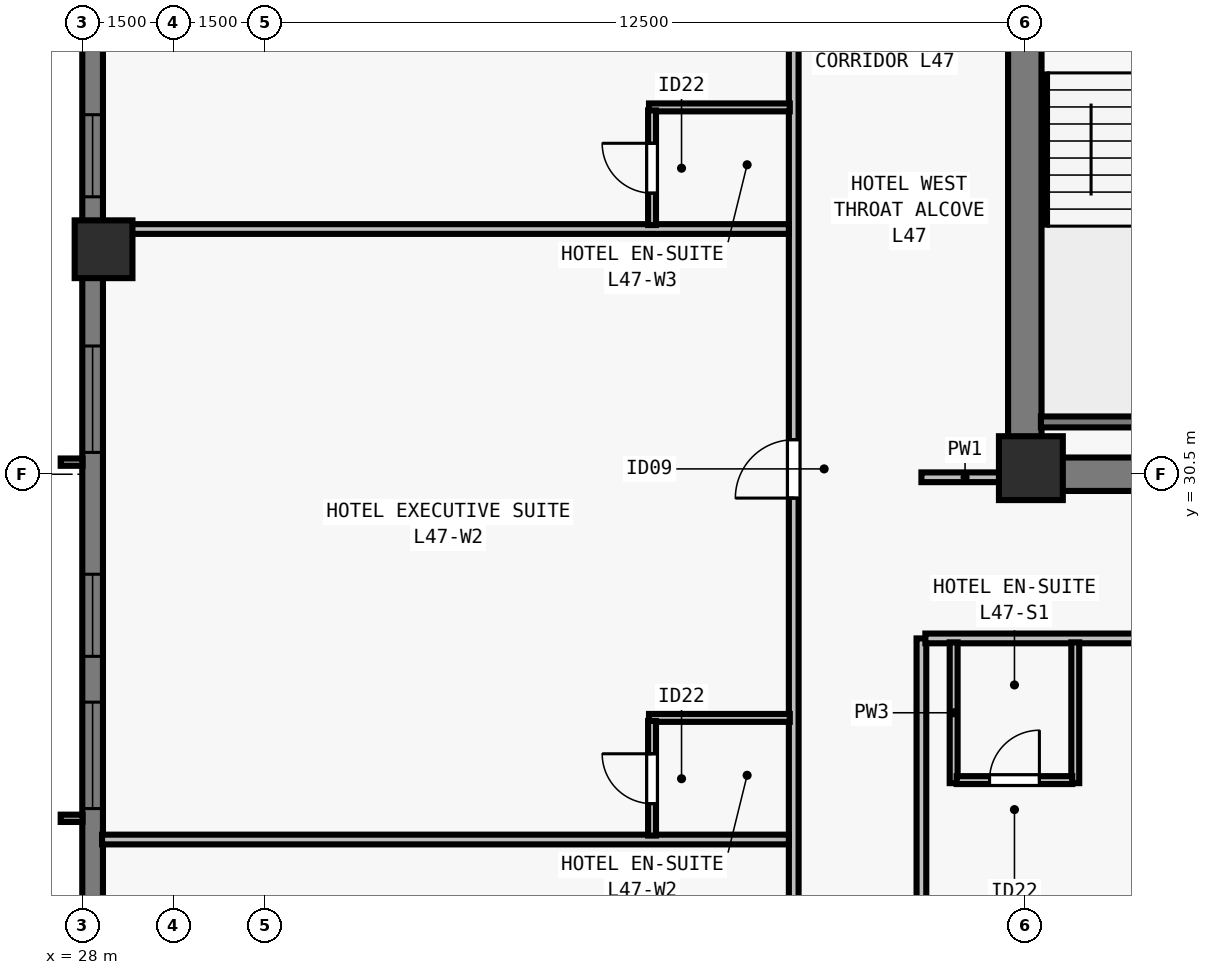
"""IFC4 building model, lengths in metres.
Left out: names, types, materials, properties, quantities, classifications, styles, units other than length and angle.
Written with IfcOpenShell. Run it as: python <this file> out.ifc"""

import sys

from ifc_helpers import new_model, si_unit, direction, frame, frame_2d, origin, origin_2d, place, context, subcontext, project, spatial, rectangle, extrude, element, fill, save


model = new_model("IFC4")
c1 = context("Model", 3, precision=1e-05, world=origin(), true_north=direction((0.0, 1.0)))
c2 = subcontext(c1, "Body", "Model", "MODEL_VIEW")
j1 = project(units=[si_unit("LENGTHUNIT", "METRE"), si_unit("PLANEANGLEUNIT", "RADIAN")], contexts=[c1])
p1 = place(None, origin())
s1 = spatial("IfcSite", under=j1, at=p1, CompositionType="ELEMENT")
p2 = place(p1, origin())
s2 = spatial("IfcBuilding", under=s1, at=p2, CompositionType="ELEMENT")
p3 = place(p2, frame((0.0, 0.0, 172.5)))
s3 = spatial("IfcBuildingStorey", under=s2, at=p3, CompositionType="ELEMENT", Elevation=172.5)
p4 = place(p3, frame((43.6, 30.6, 0.0), z_axis=(0.0, 0.0, 1.0), x_axis=(1.0, 0.0, 0.0)))
e1 = element("IfcColumn", 1, at=p4, inside=s3, PredefinedType="COLUMN", context=c2, shape_type="SweptSolid", body=[
    extrude(rectangle(XDim=1.05, YDim=1.05, at=origin_2d()), origin(), (0.0, 0.0, 1.0), 3.5),
])
p5 = place(p3, frame((28.35, 34.2, 0.0), z_axis=(0.0, 0.0, 1.0), x_axis=(0.0, 1.0, 0.0)))
e2 = element("IfcColumn", 2, at=p5, inside=s3, PredefinedType="COLUMN", context=c2, shape_type="SweptSolid", body=[
    extrude(rectangle(XDim=0.95, YDim=0.95, at=origin_2d()), origin(), (0.0, 0.0, 1.0), 3.5),
])
p6 = place(p3, frame((28.17, 19.0, 0.0), z_axis=(0.0, 0.0, 1.0), x_axis=(0.0, 1.0, 0.0)))
e3 = element("IfcWall", 3, at=p6, inside=s3, PredefinedType="SOLIDWALL", context=c2, shape_type="SweptSolid", body=[
    extrude(rectangle(XDim=39.682, YDim=0.34, at=frame_2d((19.841, 0.0))), origin(), (0.0, 0.0, 1.0), 3.28),
])
p7 = place(p6, frame((6.002, 0.0, 0.8)))
e4 = element("IfcOpeningElement", 4, at=p7, cuts=e3, PredefinedType="OPENING", context=c2, shape_type="SweptSolid", body=[
    extrude(rectangle(XDim=1.75, YDim=1.66, at=frame_2d((0.875, 0.83))), frame((0.0, 0.18, 0.0), z_axis=(0.0, -1.0, 0.0), x_axis=(1.0, 0.0, 0.0)), (0.0, 0.0, 1.0), 0.36),
])
p8 = place(p6, frame((8.505, 0.0, 0.8)))
e5 = element("IfcOpeningElement", 5, at=p8, cuts=e3, PredefinedType="OPENING", context=c2, shape_type="SweptSolid", body=[
    extrude(rectangle(XDim=1.35, YDim=1.66, at=frame_2d((0.675, 0.83))), frame((0.0, 0.18, 0.0), z_axis=(0.0, -1.0, 0.0), x_axis=(1.0, 0.0, 0.0)), (0.0, 0.0, 1.0), 0.36),
])
p9 = place(p6, frame((11.859, 0.0, 0.8)))
e6 = element("IfcOpeningElement", 6, at=p9, cuts=e3, PredefinedType="OPENING", context=c2, shape_type="SweptSolid", body=[
    extrude(rectangle(XDim=1.75, YDim=1.66, at=frame_2d((0.875, 0.83))), frame((0.0, 0.18, 0.0), z_axis=(0.0, -1.0, 0.0), x_axis=(1.0, 0.0, 0.0)), (0.0, 0.0, 1.0), 0.36),
])
p10 = place(p6, frame((16.062, 0.0, 0.8)))
e7 = element("IfcOpeningElement", 7, at=p10, cuts=e3, PredefinedType="OPENING", context=c2, shape_type="SweptSolid", body=[
    extrude(rectangle(XDim=1.35, YDim=1.66, at=frame_2d((0.675, 0.83))), frame((0.0, 0.18, 0.0), z_axis=(0.0, -1.0, 0.0), x_axis=(1.0, 0.0, 0.0)), (0.0, 0.0, 1.0), 0.36),
])
p11 = place(p6, frame((18.966, 0.0, 0.8)))
e8 = element("IfcOpeningElement", 8, at=p11, cuts=e3, PredefinedType="OPENING", context=c2, shape_type="SweptSolid", body=[
    extrude(rectangle(XDim=1.75, YDim=1.66, at=frame_2d((0.875, 0.83))), frame((0.0, 0.18, 0.0), z_axis=(0.0, -1.0, 0.0), x_axis=(1.0, 0.0, 0.0)), (0.0, 0.0, 1.0), 0.36),
])
p12 = place(p6, frame((22.27, 0.0, 0.8)))
e9 = element("IfcOpeningElement", 9, at=p12, cuts=e3, PredefinedType="OPENING", context=c2, shape_type="SweptSolid", body=[
    extrude(rectangle(XDim=1.35, YDim=1.66, at=frame_2d((0.675, 0.83))), frame((0.0, 0.18, 0.0), z_axis=(0.0, -1.0, 0.0), x_axis=(1.0, 0.0, 0.0)), (0.0, 0.0, 1.0), 0.36),
])
p13 = place(p6, frame((26.073, 0.0, 0.8)))
e10 = element("IfcOpeningElement", 10, at=p13, cuts=e3, PredefinedType="OPENING", context=c2, shape_type="SweptSolid", body=[
    extrude(rectangle(XDim=1.75, YDim=1.66, at=frame_2d((0.875, 0.83))), frame((0.0, 0.18, 0.0), z_axis=(0.0, -1.0, 0.0), x_axis=(1.0, 0.0, 0.0)), (0.0, 0.0, 1.0), 0.36),
])
p14 = place(p6, frame((29.827, 0.0, 0.8)))
e11 = element("IfcOpeningElement", 11, at=p14, cuts=e3, PredefinedType="OPENING", context=c2, shape_type="SweptSolid", body=[
    extrude(rectangle(XDim=1.35, YDim=1.66, at=frame_2d((0.675, 0.83))), frame((0.0, 0.18, 0.0), z_axis=(0.0, -1.0, 0.0), x_axis=(1.0, 0.0, 0.0)), (0.0, 0.0, 1.0), 0.36),
])
p15 = place(p6, frame((32.33, 0.0, 0.8)))
e12 = element("IfcOpeningElement", 12, at=p15, cuts=e3, PredefinedType="OPENING", context=c2, shape_type="SweptSolid", body=[
    extrude(rectangle(XDim=1.75, YDim=1.66, at=frame_2d((0.875, 0.83))), frame((0.0, 0.18, 0.0), z_axis=(0.0, -1.0, 0.0), x_axis=(1.0, 0.0, 0.0)), (0.0, 0.0, 1.0), 0.36),
])
p16 = place(p3, frame((43.225, 30.5, 0.0), z_axis=(0.0, 0.0, 1.0), x_axis=(1.0, 0.0, 0.0)))
e13 = element("IfcWall", 13, at=p16, inside=s3, PredefinedType="SHEAR", context=c2, shape_type="SweptSolid", body=[
    extrude(rectangle(XDim=17.55, YDim=0.55, at=frame_2d((8.775, 0.0))), origin(), (0.0, 0.0, 1.0), 3.28),
])
p17 = place(p3, frame((43.5, 30.765, 0.0), z_axis=(0.0, 0.0, 1.0), x_axis=(0.0, 1.0, 0.0)))
e14 = element("IfcWall", 14, at=p17, inside=s3, PredefinedType="SHEAR", context=c2, shape_type="SweptSolid", body=[
    extrude(rectangle(XDim=7.985, YDim=0.55, at=frame_2d((3.993, 0.0))), origin(), (0.0, 0.0, 1.0), 3.28),
])
p18 = place(p3, frame((39.7, 15.325, 0.0), z_axis=(0.0, 0.0, 1.0), x_axis=(0.0, 1.0, 0.0)))
e15 = element("IfcWall", 15, at=p18, inside=s3, PredefinedType="PARTITIONING", context=c2, shape_type="SweptSolid", body=[
    extrude(rectangle(XDim=47.35, YDim=0.16, at=frame_2d((23.675, 0.0))), origin(), (0.0, 0.0, 1.0), 2.555),
])
p19 = place(p18, frame((5.451, 0.0, 0.0)))
e16 = element("IfcOpeningElement", 16, at=p19, cuts=e15, PredefinedType="OPENING", context=c2, shape_type="SweptSolid", body=[
    extrude(rectangle(XDim=0.96, YDim=2.15, at=frame_2d((0.48, 1.075))), frame((0.0, 0.09, 0.0), z_axis=(0.0, -1.0, 0.0), x_axis=(1.0, 0.0, 0.0)), (0.0, 0.0, 1.0), 0.18),
])
p20 = place(p18, frame((14.783, 0.0, 0.0)))
e17 = element("IfcOpeningElement", 17, at=p20, cuts=e15, PredefinedType="OPENING", context=c2, shape_type="SweptSolid", body=[
    extrude(rectangle(XDim=0.96, YDim=2.15, at=frame_2d((0.48, 1.075))), frame((0.0, 0.09, 0.0), z_axis=(0.0, -1.0, 0.0), x_axis=(1.0, 0.0, 0.0)), (0.0, 0.0, 1.0), 0.18),
])
p21 = place(p18, frame((24.215, 0.0, 0.0)))
e18 = element("IfcOpeningElement", 18, at=p21, cuts=e15, PredefinedType="OPENING", context=c2, shape_type="SweptSolid", body=[
    extrude(rectangle(XDim=0.96, YDim=2.15, at=frame_2d((0.48, 1.075))), frame((0.0, 0.09, 0.0), z_axis=(0.0, -1.0, 0.0), x_axis=(1.0, 0.0, 0.0)), (0.0, 0.0, 1.0), 0.18),
])
p22 = place(p18, frame((33.647, 0.0, 0.0)))
e19 = element("IfcOpeningElement", 19, at=p22, cuts=e15, PredefinedType="OPENING", context=c2, shape_type="SweptSolid", body=[
    extrude(rectangle(XDim=0.96, YDim=2.15, at=frame_2d((0.48, 1.075))), frame((0.0, 0.09, 0.0), z_axis=(0.0, -1.0, 0.0), x_axis=(1.0, 0.0, 0.0)), (0.0, 0.0, 1.0), 0.18),
])
p23 = place(p18, frame((43.258, 0.0, 0.0)))
e20 = element("IfcOpeningElement", 20, at=p23, cuts=e15, PredefinedType="OPENING", context=c2, shape_type="SweptSolid", body=[
    extrude(rectangle(XDim=0.96, YDim=2.15, at=frame_2d((0.48, 1.075))), frame((0.0, 0.09, 0.0), z_axis=(0.0, -1.0, 0.0), x_axis=(1.0, 0.0, 0.0)), (0.0, 0.0, 1.0), 0.18),
])
p24 = place(p3, frame((41.8, 15.325, 0.0), z_axis=(0.0, 0.0, 1.0), x_axis=(0.0, 1.0, 0.0)))
e21 = element("IfcWall", 21, at=p24, inside=s3, PredefinedType="PARTITIONING", context=c2, shape_type="SweptSolid", body=[
    extrude(rectangle(XDim=12.475, YDim=0.16, at=frame_2d((6.238, 0.0))), origin(), (0.0, 0.0, 1.0), 3.28),
])
p25 = place(p3, frame((41.8, 30.45, 0.0), z_axis=(0.0, 0.0, 1.0), x_axis=(1.0, 0.0, 0.0)))
e22 = element("IfcWall", 22, at=p25, inside=s3, PredefinedType="PARTITIONING", context=c2, shape_type="SweptSolid", body=[
    extrude(rectangle(XDim=1.435, YDim=0.16, at=frame_2d((0.718, 0.0))), origin(), (0.0, 0.0, 1.0), 3.28),
])
p26 = place(p3, frame((41.865, 27.8, 0.0), z_axis=(0.0, 0.0, 1.0), x_axis=(1.0, 0.0, 0.0)))
e23 = element("IfcWall", 23, at=p26, inside=s3, PredefinedType="PARTITIONING", context=c2, shape_type="SweptSolid", body=[
    extrude(rectangle(XDim=22.07, YDim=0.16, at=frame_2d((11.035, 0.0))), origin(), (0.0, 0.0, 1.0), 3.28),
])
p27 = place(p26, frame((4.232, 0.0, 0.0)))
e24 = element("IfcOpeningElement", 24, at=p27, cuts=e23, PredefinedType="OPENING", context=c2, shape_type="SweptSolid", body=[
    extrude(rectangle(XDim=0.96, YDim=2.15, at=frame_2d((0.48, 1.075))), frame((0.0, 0.09, 0.0), z_axis=(0.0, -1.0, 0.0), x_axis=(1.0, 0.0, 0.0)), (0.0, 0.0, 1.0), 0.18),
])
p28 = place(p26, frame((11.545, 0.0, 0.0)))
e25 = element("IfcOpeningElement", 25, at=p28, cuts=e23, PredefinedType="OPENING", context=c2, shape_type="SweptSolid", body=[
    extrude(rectangle(XDim=0.96, YDim=2.15, at=frame_2d((0.48, 1.075))), frame((0.0, 0.09, 0.0), z_axis=(0.0, -1.0, 0.0), x_axis=(1.0, 0.0, 0.0)), (0.0, 0.0, 1.0), 0.18),
])
p29 = place(p26, frame((19.168, 0.0, 0.0)))
e26 = element("IfcOpeningElement", 26, at=p29, cuts=e23, PredefinedType="OPENING", context=c2, shape_type="SweptSolid", body=[
    extrude(rectangle(XDim=0.96, YDim=2.15, at=frame_2d((0.48, 1.075))), frame((0.0, 0.09, 0.0), z_axis=(0.0, -1.0, 0.0), x_axis=(1.0, 0.0, 0.0)), (0.0, 0.0, 1.0), 0.18),
])
for number, where, z_axis, x_axis in (
    (27, (42.33, 25.42, 0.0), (0.0, 0.0, 1.0), (0.0, 1.0, 0.0)),
    (28, (44.33, 25.42, 0.0), (0.0, 0.0, 1.0), (0.0, 1.0, 0.0)),
):
    element("IfcWall", number, at=place(p3, frame(where, z_axis=z_axis, x_axis=x_axis)), inside=s3, PredefinedType="PLUMBINGWALL", context=c2, shape_type="SweptSolid", body=[
        extrude(rectangle(XDim=2.315, YDim=0.13, at=frame_2d((1.158, 0.0))), origin(), (0.0, 0.0, 1.0), 3.28),
    ])
p30 = place(p3, frame((42.38, 25.47, 0.0), z_axis=(0.0, 0.0, 1.0), x_axis=(1.0, 0.0, 0.0)))
e29 = element("IfcWall", 29, at=p30, inside=s3, PredefinedType="PLUMBINGWALL", context=c2, shape_type="SweptSolid", body=[
    extrude(rectangle(XDim=1.9, YDim=0.13, at=frame_2d((0.95, 0.0))), origin(), (0.0, 0.0, 1.0), 3.28),
])
p31 = place(p30, frame((0.54, 0.0, 0.0)))
e30 = element("IfcOpeningElement", 30, at=p31, cuts=e29, PredefinedType="OPENING", context=c2, shape_type="SweptSolid", body=[
    extrude(rectangle(XDim=0.82, YDim=2.1, at=frame_2d((0.41, 1.05))), frame((0.0, 0.075, 0.0), z_axis=(0.0, -1.0, 0.0), x_axis=(1.0, 0.0, 0.0)), (0.0, 0.0, 1.0), 0.15),
])
p32 = place(p3, frame((28.325, 24.493, 0.0), z_axis=(0.0, 0.0, 1.0), x_axis=(1.0, 0.0, 0.0)))
e31 = element("IfcWall", 31, at=p32, inside=s3, PredefinedType="PARTITIONING", context=c2, shape_type="SweptSolid", body=[
    extrude(rectangle(XDim=11.295, YDim=0.16, at=frame_2d((5.647, 0.0))), origin(), (0.0, 0.0, 1.0), 2.896),
])
p33 = place(p3, frame((37.32, 26.493, 0.0), z_axis=(0.0, 0.0, 1.0), x_axis=(1.0, 0.0, 0.0)))
e32 = element("IfcWall", 32, at=p33, inside=s3, PredefinedType="PLUMBINGWALL", context=c2, shape_type="SweptSolid", body=[
    extrude(rectangle(XDim=2.315, YDim=0.13, at=frame_2d((1.157, 0.0))), origin(), (0.0, 0.0, 1.0), 2.896),
])
p34 = place(p3, frame((37.37, 24.558, 0.0), z_axis=(0.0, 0.0, 1.0), x_axis=(0.0, 1.0, 0.0)))
e33 = element("IfcWall", 33, at=p34, inside=s3, PredefinedType="PLUMBINGWALL", context=c2, shape_type="SweptSolid", body=[
    extrude(rectangle(XDim=1.885, YDim=0.13, at=frame_2d((0.942, 0.0))), origin(), (0.0, 0.0, 1.0), 3.28),
])
p35 = place(p34, frame((0.525, 0.0, 0.0)))
e34 = element("IfcOpeningElement", 34, at=p35, cuts=e33, PredefinedType="OPENING", context=c2, shape_type="SweptSolid", body=[
    extrude(rectangle(XDim=0.82, YDim=2.1, at=frame_2d((0.41, 1.05))), frame((0.0, 0.075, 0.0), z_axis=(0.0, -1.0, 0.0), x_axis=(1.0, 0.0, 0.0)), (0.0, 0.0, 1.0), 0.15),
])
p36 = place(p3, frame((28.325, 34.533, 0.0), z_axis=(0.0, 0.0, 1.0), x_axis=(1.0, 0.0, 0.0)))
e35 = element("IfcWall", 35, at=p36, inside=s3, PredefinedType="PARTITIONING", context=c2, shape_type="SweptSolid", body=[
    extrude(rectangle(XDim=11.295, YDim=0.16, at=frame_2d((5.647, 0.0))), origin(), (0.0, 0.0, 1.0), 2.896),
])
p37 = place(p3, frame((37.32, 36.533, 0.0), z_axis=(0.0, 0.0, 1.0), x_axis=(1.0, 0.0, 0.0)))
e36 = element("IfcWall", 36, at=p37, inside=s3, PredefinedType="PLUMBINGWALL", context=c2, shape_type="SweptSolid", body=[
    extrude(rectangle(XDim=2.315, YDim=0.13, at=frame_2d((1.157, 0.0))), origin(), (0.0, 0.0, 1.0), 3.28),
])
p38 = place(p3, frame((37.37, 34.598, 0.0), z_axis=(0.0, 0.0, 1.0), x_axis=(0.0, 1.0, 0.0)))
e37 = element("IfcWall", 37, at=p38, inside=s3, PredefinedType="PLUMBINGWALL", context=c2, shape_type="SweptSolid", body=[
    extrude(rectangle(XDim=1.885, YDim=0.13, at=frame_2d((0.942, 0.0))), origin(), (0.0, 0.0, 1.0), 3.28),
])
p39 = place(p38, frame((0.525, 0.0, 0.0)))
e38 = element("IfcOpeningElement", 38, at=p39, cuts=e37, PredefinedType="OPENING", context=c2, shape_type="SweptSolid", body=[
    extrude(rectangle(XDim=0.82, YDim=2.1, at=frame_2d((0.41, 1.05))), frame((0.0, 0.075, 0.0), z_axis=(0.0, -1.0, 0.0), x_axis=(1.0, 0.0, 0.0)), (0.0, 0.0, 1.0), 0.15),
])
p40 = place(p3, frame((43.765, 31.36, 0.0), z_axis=(0.0, 0.0, 1.0), x_axis=(1.0, 0.0, 0.0)))
e39 = element("IfcWall", 39, at=p40, inside=s3, PredefinedType="SOLIDWALL", context=c2, shape_type="SweptSolid", body=[
    extrude(rectangle(XDim=3.23, YDim=0.18, at=frame_2d((1.615, 0.0))), origin(), (0.0, 0.0, 1.0), 3.28),
])
p41 = place(p7, origin())
e40 = element("IfcWindow", 40, at=p41, inside=s3, PartitioningType="SINGLE_PANEL", PredefinedType="WINDOW", context=c2, shape_type="SweptSolid", body=[
    extrude(rectangle(XDim=1.75, YDim=1.66, at=frame_2d((0.875, 0.83))), frame((0.0, -0.05, 0.0), z_axis=(0.0, -1.0, 0.0), x_axis=(1.0, 0.0, 0.0)), (0.0, 0.0, 1.0), 0.06),
])
fill(e4, e40)
p42 = place(p8, origin())
e41 = element("IfcWindow", 41, at=p42, inside=s3, PartitioningType="SINGLE_PANEL", PredefinedType="WINDOW", context=c2, shape_type="SweptSolid", body=[
    extrude(rectangle(XDim=1.35, YDim=1.66, at=frame_2d((0.675, 0.83))), frame((0.0, -0.05, 0.0), z_axis=(0.0, -1.0, 0.0), x_axis=(1.0, 0.0, 0.0)), (0.0, 0.0, 1.0), 0.06),
])
fill(e5, e41)
p43 = place(p9, origin())
e42 = element("IfcWindow", 42, at=p43, inside=s3, PartitioningType="SINGLE_PANEL", PredefinedType="WINDOW", context=c2, shape_type="SweptSolid", body=[
    extrude(rectangle(XDim=1.75, YDim=1.66, at=frame_2d((0.875, 0.83))), frame((0.0, -0.05, 0.0), z_axis=(0.0, -1.0, 0.0), x_axis=(1.0, 0.0, 0.0)), (0.0, 0.0, 1.0), 0.06),
])
fill(e6, e42)
p44 = place(p10, origin())
e43 = element("IfcWindow", 43, at=p44, inside=s3, PartitioningType="SINGLE_PANEL", PredefinedType="WINDOW", context=c2, shape_type="SweptSolid", body=[
    extrude(rectangle(XDim=1.35, YDim=1.66, at=frame_2d((0.675, 0.83))), frame((0.0, -0.05, 0.0), z_axis=(0.0, -1.0, 0.0), x_axis=(1.0, 0.0, 0.0)), (0.0, 0.0, 1.0), 0.06),
])
fill(e7, e43)
p45 = place(p31, origin())
e44 = element("IfcDoor", 44, at=p45, inside=s3, OperationType="SINGLE_SWING_RIGHT", PredefinedType="DOOR", context=c2, shape_type="SweptSolid", body=[
    extrude(rectangle(XDim=0.82, YDim=2.1, at=frame_2d((0.41, 1.05))), frame((0.0, 0.025, 0.0), z_axis=(0.0, -1.0, 0.0), x_axis=(1.0, 0.0, 0.0)), (0.0, 0.0, 1.0), 0.05),
])
fill(e30, e44)
p46 = place(p35, origin())
e45 = element("IfcDoor", 45, at=p46, inside=s3, OperationType="SINGLE_SWING_RIGHT", PredefinedType="DOOR", context=c2, shape_type="SweptSolid", body=[
    extrude(rectangle(XDim=0.82, YDim=2.1, at=frame_2d((0.41, 1.05))), frame((0.0, 0.025, 0.0), z_axis=(0.0, -1.0, 0.0), x_axis=(1.0, 0.0, 0.0)), (0.0, 0.0, 1.0), 0.05),
])
fill(e34, e45)
p47 = place(p20, origin())
e46 = element("IfcDoor", 46, at=p47, inside=s3, OperationType="SINGLE_SWING_LEFT", PredefinedType="DOOR", context=c2, shape_type="SweptSolid", body=[
    extrude(rectangle(XDim=0.96, YDim=2.15, at=frame_2d((0.48, 1.075))), frame((0.0, 0.025, 0.0), z_axis=(0.0, -1.0, 0.0), x_axis=(1.0, 0.0, 0.0)), (0.0, 0.0, 1.0), 0.05),
])
fill(e17, e46)
p48 = place(p39, origin())
e47 = element("IfcDoor", 47, at=p48, inside=s3, OperationType="SINGLE_SWING_RIGHT", PredefinedType="DOOR", context=c2, shape_type="SweptSolid", body=[
    extrude(rectangle(XDim=0.82, YDim=2.1, at=frame_2d((0.41, 1.05))), frame((0.0, 0.025, 0.0), z_axis=(0.0, -1.0, 0.0), x_axis=(1.0, 0.0, 0.0)), (0.0, 0.0, 1.0), 0.05),
])
fill(e38, e47)
save(model, sys.argv[1])
